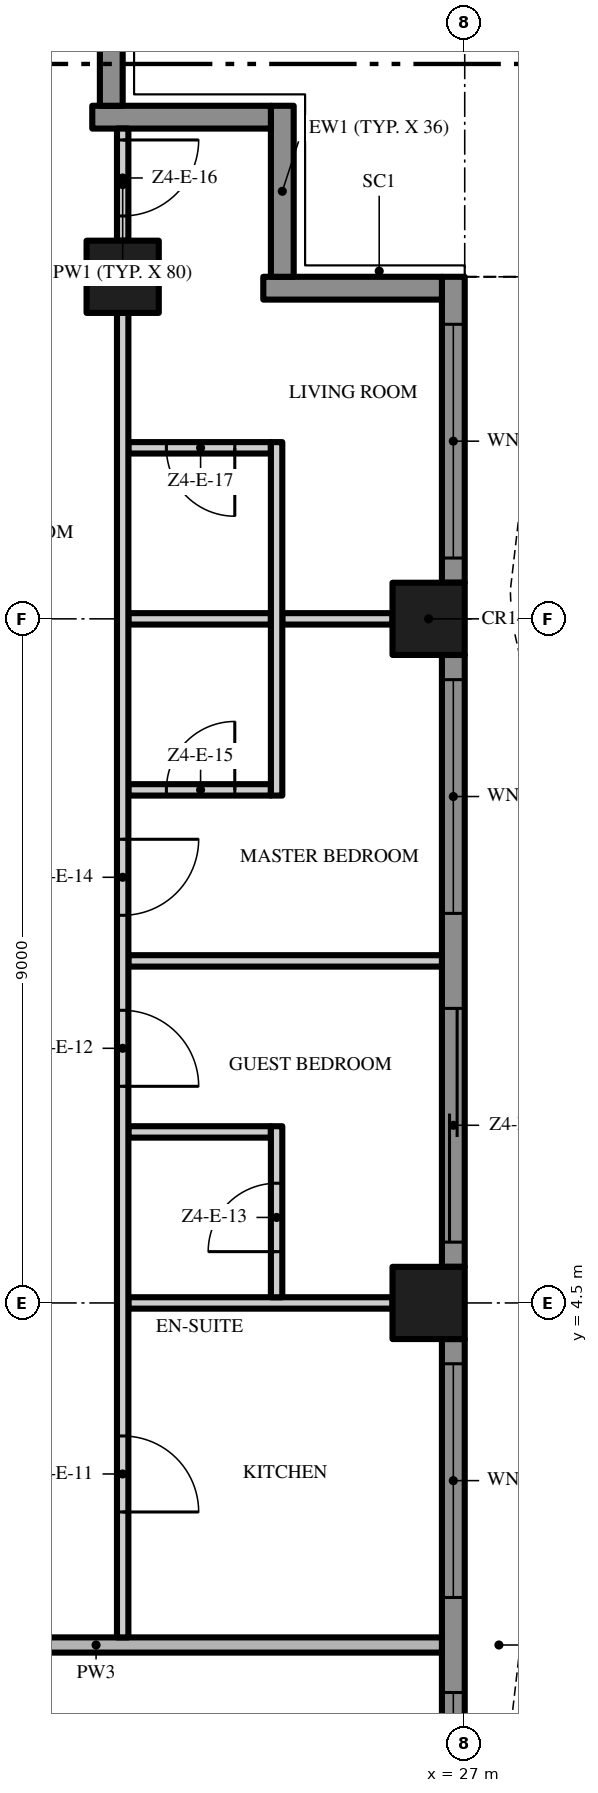
"""IFC4 building model, lengths in metres.
Left out: names, types, materials, properties, quantities, classifications, styles, units other than length and angle.
Written with IfcOpenShell. Run it as: python <this file> out.ifc"""

import sys

from ifc_helpers import new_model, si_unit, direction, frame, frame_2d, origin, origin_2d, place, context, subcontext, project, spatial, polyline, rectangle, outline, extrude, element, fill, save


model = new_model("IFC4")
c1 = context("Model", 3, precision=1e-05, world=origin(), true_north=direction((0.0, 1.0)))
c2 = subcontext(c1, "Body", "Model", "MODEL_VIEW")
j1 = project(units=[si_unit("LENGTHUNIT", "METRE"), si_unit("PLANEANGLEUNIT", "RADIAN")], contexts=[c1])
p1 = place(None, origin())
s1 = spatial("IfcSite", under=j1, at=p1, CompositionType="ELEMENT")
p2 = place(p1, origin())
s2 = spatial("IfcBuilding", under=s1, at=p2, CompositionType="ELEMENT")
p3 = place(p2, frame((0.0, 0.0, 230.0)))
s3 = spatial("IfcBuildingStorey", under=s2, at=p3, CompositionType="ELEMENT", Elevation=230.0)
for number, where, z_axis, x_axis in (
    (1, (26.525, 13.5, 0.0), (0.0, 0.0, 1.0), (1.0, 0.0, 0.0)),
    (2, (22.5, 18.0, 0.0), (0.0, 0.0, 1.0), (1.0, 0.0, 0.0)),
    (3, (26.525, 4.5, 0.0), (0.0, 0.0, 1.0), (1.0, 0.0, 0.0)),
):
    element("IfcColumn", number, at=place(p3, frame(where, z_axis=z_axis, x_axis=x_axis)), inside=s3, PredefinedType="COLUMN", context=c2, shape_type="SweptSolid", body=[
        extrude(rectangle(XDim=0.95, YDim=0.95, at=origin_2d()), origin(), (0.0, 0.0, 1.0), 3.5),
    ])
p4 = place(p3, frame((26.85, 4.025, 0.0), z_axis=(0.0, 0.0, 1.0), x_axis=(0.0, -1.0, 0.0)))
e4 = element("IfcWall", 4, at=p4, inside=s3, PredefinedType="SOLIDWALL", context=c2, shape_type="SweptSolid", body=[
    extrude(rectangle(XDim=8.05, YDim=0.3, at=frame_2d((4.025, 0.0))), origin(), (0.0, 0.0, 1.0), 3.5),
])
p5 = place(p4, frame((4.65, 0.0, 0.45)))
e5 = element("IfcOpeningElement", 5, at=p5, cuts=e4, PredefinedType="OPENING", context=c2, shape_type="SweptSolid", body=[
    extrude(rectangle(XDim=3.075, YDim=2.65, at=frame_2d((1.538, 1.325))), frame((0.0, 0.16, 0.0), z_axis=(0.0, -1.0, 0.0), x_axis=(1.0, 0.0, 0.0)), (0.0, 0.0, 1.0), 0.32),
])
p6 = place(p4, frame((0.325, 0.0, 0.45)))
e6 = element("IfcOpeningElement", 6, at=p6, cuts=e4, PredefinedType="OPENING", context=c2, shape_type="SweptSolid", body=[
    extrude(rectangle(XDim=3.075, YDim=2.65, at=frame_2d((1.538, 1.325))), frame((0.0, 0.16, 0.0), z_axis=(0.0, -1.0, 0.0), x_axis=(1.0, 0.0, 0.0)), (0.0, 0.0, 1.0), 0.32),
])
p7 = place(p3, frame((26.85, 13.025, 0.0), z_axis=(0.0, 0.0, 1.0), x_axis=(0.0, -1.0, 0.0)))
e7 = element("IfcWall", 7, at=p7, inside=s3, PredefinedType="SOLIDWALL", context=c2, shape_type="SweptSolid", body=[
    extrude(rectangle(XDim=8.05, YDim=0.3, at=frame_2d((4.025, 0.0))), origin(), (0.0, 0.0, 1.0), 3.5),
])
p8 = place(p7, frame((4.65, 0.0, 0.0)))
e8 = element("IfcOpeningElement", 8, at=p8, cuts=e7, PredefinedType="OPENING", context=c2, shape_type="SweptSolid", body=[
    extrude(rectangle(XDim=3.075, YDim=2.4, at=frame_2d((1.538, 1.2))), frame((0.0, 0.16, 0.0), z_axis=(0.0, -1.0, 0.0), x_axis=(1.0, 0.0, 0.0)), (0.0, 0.0, 1.0), 0.32),
])
p9 = place(p7, frame((0.325, 0.0, 0.45)))
e9 = element("IfcOpeningElement", 9, at=p9, cuts=e7, PredefinedType="OPENING", context=c2, shape_type="SweptSolid", body=[
    extrude(rectangle(XDim=3.075, YDim=2.65, at=frame_2d((1.538, 1.325))), frame((0.0, 0.16, 0.0), z_axis=(0.0, -1.0, 0.0), x_axis=(1.0, 0.0, 0.0)), (0.0, 0.0, 1.0), 0.32),
])
p10 = place(p3, frame((26.85, 18.0, 0.0), z_axis=(0.0, 0.0, 1.0), x_axis=(0.0, -1.0, 0.0)))
e10 = element("IfcWall", 10, at=p10, inside=s3, PredefinedType="SOLIDWALL", context=c2, shape_type="SweptSolid", body=[
    extrude(rectangle(XDim=4.025, YDim=0.3, at=frame_2d((2.013, 0.0))), origin(), (0.0, 0.0, 1.0), 3.5),
])
p11 = place(p10, frame((0.625, 0.0, 0.45)))
e11 = element("IfcOpeningElement", 11, at=p11, cuts=e10, PredefinedType="OPENING", context=c2, shape_type="SweptSolid", body=[
    extrude(rectangle(XDim=3.075, YDim=2.65, at=frame_2d((1.538, 1.325))), frame((0.0, 0.16, 0.0), z_axis=(0.0, -1.0, 0.0), x_axis=(1.0, 0.0, 0.0)), (0.0, 0.0, 1.0), 0.32),
])
p12 = place(p3, frame((24.35, 17.85, 0.0), z_axis=(0.0, 0.0, 1.0), x_axis=(1.0, 0.0, 0.0)))
e12 = element("IfcWall", 12, at=p12, inside=s3, PredefinedType="SOLIDWALL", context=c2, shape_type="SweptSolid", body=[
    extrude(rectangle(XDim=2.35, YDim=0.3, at=frame_2d((1.175, 0.0))), origin(), (0.0, 0.0, 1.0), 3.5),
])
p13 = place(p3, frame((24.6, 20.25, 0.0), z_axis=(0.0, 0.0, 1.0), x_axis=(0.0, -1.0, 0.0)))
e13 = element("IfcWall", 13, at=p13, inside=s3, PredefinedType="SOLIDWALL", context=c2, shape_type="SweptSolid", body=[
    extrude(rectangle(XDim=2.25, YDim=0.3, at=frame_2d((1.125, 0.0))), origin(), (0.0, 0.0, 1.0), 3.5),
])
p14 = place(p3, frame((22.1, 20.1, 0.0), z_axis=(0.0, 0.0, 1.0), x_axis=(1.0, 0.0, 0.0)))
e14 = element("IfcWall", 14, at=p14, inside=s3, PredefinedType="SOLIDWALL", context=c2, shape_type="SweptSolid", body=[
    extrude(rectangle(XDim=2.35, YDim=0.3, at=frame_2d((1.175, 0.0))), origin(), (0.0, 0.0, 1.0), 3.5),
])
p15 = place(p3, frame((22.35, 22.5, 0.0), z_axis=(0.0, 0.0, 1.0), x_axis=(0.0, -1.0, 0.0)))
e15 = element("IfcWall", 15, at=p15, inside=s3, PredefinedType="SOLIDWALL", context=c2, shape_type="SweptSolid", body=[
    extrude(rectangle(XDim=2.25, YDim=0.3, at=frame_2d((1.125, 0.0))), origin(), (0.0, 0.0, 1.0), 3.5),
])
p16 = place(p3, origin())
e16 = element("IfcWall", 16, at=p16, inside=s3, PredefinedType="USERDEFINED", context=c2, shape_type="SweptSolid", body=[
    extrude(outline(polyline([(27.951, -18.0), (27.615, -16.5), (27.6, -16.125), (27.731, -15.0), (28.255, -13.5), (28.988, -12.0), (29.649, -10.5), (29.985, -9.0), (30.0, -8.625), (29.869, -7.5), (29.345, -6.0), (28.612, -4.5), (27.951, -3.0), (27.615, -1.5), (27.6, -1.125), (27.731, 0.0), (28.255, 1.5), (28.988, 3.0), (29.649, 4.5), (29.985, 6.0), (30.0, 6.375), (29.869, 7.5), (29.345, 9.0), (28.612, 10.5), (27.951, 12.0), (27.615, 13.5), (27.6, 13.875), (27.731, 15.0), (28.255, 16.5), (28.988, 18.0), (28.763, 18.11), (28.024, 16.596), (27.486, 15.056), (27.349, 13.885), (27.366, 13.467), (27.713, 11.921), (28.385, 10.395), (29.114, 8.904), (29.624, 7.444), (29.749, 6.365), (29.736, 6.033), (29.41, 4.579), (28.761, 3.105), (28.024, 1.596), (27.486, 0.056), (27.349, -1.115), (27.366, -1.533), (27.713, -3.079), (28.385, -4.605), (29.114, -6.096), (29.624, -7.556), (29.749, -8.635), (29.736, -8.967), (29.41, -10.421), (28.761, -11.895), (28.024, -13.404), (27.486, -14.944), (27.349, -16.115), (27.366, -16.533), (27.708, -18.055), (27.951, -18.0)])), origin(), (0.0, 0.0, 1.0), 0.9),
])
p17 = place(p3, frame((17.6, 0.0, 0.0), z_axis=(0.0, 0.0, 1.0), x_axis=(1.0, 0.0, 0.0)))
e17 = element("IfcWall", 17, at=p17, inside=s3, PredefinedType="PARTITIONING", context=c2, shape_type="SweptSolid", body=[
    extrude(rectangle(XDim=9.1, YDim=0.2, at=frame_2d((4.55, 0.0))), origin(), (0.0, 0.0, 1.0), 3.5),
])
p18 = place(p3, frame((22.575, 4.5, 0.0), z_axis=(0.0, 0.0, 1.0), x_axis=(1.0, 0.0, 0.0)))
e18 = element("IfcWall", 18, at=p18, inside=s3, PredefinedType="PARTITIONING", context=c2, shape_type="SweptSolid", body=[
    extrude(rectangle(XDim=3.475, YDim=0.15, at=frame_2d((1.738, 0.0))), origin(), (0.0, 0.0, 1.0), 3.5),
])
p19 = place(p3, frame((22.575, 6.75, 0.0), z_axis=(0.0, 0.0, 1.0), x_axis=(1.0, 0.0, 0.0)))
e19 = element("IfcWall", 19, at=p19, inside=s3, PredefinedType="PARTITIONING", context=c2, shape_type="SweptSolid", body=[
    extrude(rectangle(XDim=1.875, YDim=0.15, at=frame_2d((0.938, 0.0))), origin(), (0.0, 0.0, 1.0), 3.5),
])
p20 = place(p3, frame((22.575, 9.0, 0.0), z_axis=(0.0, 0.0, 1.0), x_axis=(1.0, 0.0, 0.0)))
e20 = element("IfcWall", 20, at=p20, inside=s3, PredefinedType="PARTITIONING", context=c2, shape_type="SweptSolid", body=[
    extrude(rectangle(XDim=4.125, YDim=0.15, at=frame_2d((2.062, 0.0))), origin(), (0.0, 0.0, 1.0), 3.5),
])
p21 = place(p3, frame((22.575, 11.25, 0.0), z_axis=(0.0, 0.0, 1.0), x_axis=(1.0, 0.0, 0.0)))
e21 = element("IfcWall", 21, at=p21, inside=s3, PredefinedType="PARTITIONING", context=c2, shape_type="SweptSolid", body=[
    extrude(rectangle(XDim=1.875, YDim=0.15, at=frame_2d((0.938, 0.0))), origin(), (0.0, 0.0, 1.0), 3.5),
])
p22 = place(p21, frame((0.5, 0.0, 0.0)))
e22 = element("IfcOpeningElement", 22, at=p22, cuts=e21, PredefinedType="OPENING", context=c2, shape_type="SweptSolid", body=[
    extrude(rectangle(XDim=0.9, YDim=2.1, at=frame_2d((0.45, 1.05))), frame((0.0, 0.085, 0.0), z_axis=(0.0, -1.0, 0.0), x_axis=(1.0, 0.0, 0.0)), (0.0, 0.0, 1.0), 0.17),
])
p23 = place(p3, frame((22.575, 13.5, 0.0), z_axis=(0.0, 0.0, 1.0), x_axis=(1.0, 0.0, 0.0)))
e23 = element("IfcWall", 23, at=p23, inside=s3, PredefinedType="PARTITIONING", context=c2, shape_type="SweptSolid", body=[
    extrude(rectangle(XDim=1.875, YDim=0.15, at=frame_2d((0.938, 0.0))), origin(), (0.0, 0.0, 1.0), 3.5),
])
p24 = place(p3, frame((24.6, 13.5, 0.0), z_axis=(0.0, 0.0, 1.0), x_axis=(1.0, 0.0, 0.0)))
e24 = element("IfcWall", 24, at=p24, inside=s3, PredefinedType="PARTITIONING", context=c2, shape_type="SweptSolid", body=[
    extrude(rectangle(XDim=1.45, YDim=0.15, at=frame_2d((0.725, 0.0))), origin(), (0.0, 0.0, 1.0), 3.5),
])
p25 = place(p3, frame((24.45, 15.75, 0.0), z_axis=(0.0, 0.0, 1.0), x_axis=(-1.0, 0.0, 0.0)))
e25 = element("IfcWall", 25, at=p25, inside=s3, PredefinedType="PARTITIONING", context=c2, shape_type="SweptSolid", body=[
    extrude(rectangle(XDim=1.875, YDim=0.15, at=frame_2d((0.938, 0.0))), origin(), (0.0, 0.0, 1.0), 3.5),
])
p26 = place(p25, frame((0.475, 0.0, 0.0)))
e26 = element("IfcOpeningElement", 26, at=p26, cuts=e25, PredefinedType="OPENING", context=c2, shape_type="SweptSolid", body=[
    extrude(rectangle(XDim=0.9, YDim=2.1, at=frame_2d((0.45, 1.05))), frame((0.0, 0.085, 0.0), z_axis=(0.0, -1.0, 0.0), x_axis=(1.0, 0.0, 0.0)), (0.0, 0.0, 1.0), 0.17),
])
p27 = place(p3, frame((22.5, 17.525, 0.0), z_axis=(0.0, 0.0, 1.0), x_axis=(0.0, -1.0, 0.0)))
e27 = element("IfcWall", 27, at=p27, inside=s3, PredefinedType="PARTITIONING", context=c2, shape_type="SweptSolid", body=[
    extrude(rectangle(XDim=17.425, YDim=0.15, at=frame_2d((8.713, 0.0))), origin(), (0.0, 0.0, 1.0), 3.5),
])
p28 = place(p27, frame((14.775, 0.0, 0.0)))
e28 = element("IfcOpeningElement", 28, at=p28, cuts=e27, PredefinedType="OPENING", context=c2, shape_type="SweptSolid", body=[
    extrude(rectangle(XDim=1.0, YDim=2.4, at=frame_2d((0.5, 1.2))), frame((0.0, 0.085, 0.0), z_axis=(0.0, -1.0, 0.0), x_axis=(1.0, 0.0, 0.0)), (0.0, 0.0, 1.0), 0.17),
])
p29 = place(p27, frame((9.175, 0.0, 0.0)))
e29 = element("IfcOpeningElement", 29, at=p29, cuts=e27, PredefinedType="OPENING", context=c2, shape_type="SweptSolid", body=[
    extrude(rectangle(XDim=1.0, YDim=2.4, at=frame_2d((0.5, 1.2))), frame((0.0, 0.085, 0.0), z_axis=(0.0, -1.0, 0.0), x_axis=(1.0, 0.0, 0.0)), (0.0, 0.0, 1.0), 0.17),
])
p30 = place(p27, frame((6.925, 0.0, 0.0)))
e30 = element("IfcOpeningElement", 30, at=p30, cuts=e27, PredefinedType="OPENING", context=c2, shape_type="SweptSolid", body=[
    extrude(rectangle(XDim=1.0, YDim=2.4, at=frame_2d((0.5, 1.2))), frame((0.0, 0.085, 0.0), z_axis=(0.0, -1.0, 0.0), x_axis=(1.0, 0.0, 0.0)), (0.0, 0.0, 1.0), 0.17),
])
p31 = place(p3, frame((22.5, 19.95, 0.0), z_axis=(0.0, 0.0, 1.0), x_axis=(0.0, -1.0, 0.0)))
e31 = element("IfcWall", 31, at=p31, inside=s3, PredefinedType="PARTITIONING", context=c2, shape_type="SweptSolid", body=[
    extrude(rectangle(XDim=1.475, YDim=0.15, at=frame_2d((0.738, 0.0))), origin(), (0.0, 0.0, 1.0), 3.5),
])
p32 = place(p31, frame((0.15, 0.0, 0.0)))
e32 = element("IfcOpeningElement", 32, at=p32, cuts=e31, PredefinedType="OPENING", context=c2, shape_type="SweptSolid", body=[
    extrude(rectangle(XDim=1.0, YDim=2.4, at=frame_2d((0.5, 1.2))), frame((0.0, 0.085, 0.0), z_axis=(0.0, -1.0, 0.0), x_axis=(1.0, 0.0, 0.0)), (0.0, 0.0, 1.0), 0.17),
])
p33 = place(p3, frame((24.525, 4.575, 0.0), z_axis=(0.0, 0.0, 1.0), x_axis=(0.0, 1.0, 0.0)))
e33 = element("IfcWall", 33, at=p33, inside=s3, PredefinedType="PARTITIONING", context=c2, shape_type="SweptSolid", body=[
    extrude(rectangle(XDim=2.25, YDim=0.15, at=frame_2d((1.125, 0.0))), origin(), (0.0, 0.0, 1.0), 3.5),
])
p34 = place(p33, frame((0.6, 0.0, 0.0)))
e34 = element("IfcOpeningElement", 34, at=p34, cuts=e33, PredefinedType="OPENING", context=c2, shape_type="SweptSolid", body=[
    extrude(rectangle(XDim=0.9, YDim=2.1, at=frame_2d((0.45, 1.05))), frame((0.0, 0.085, 0.0), z_axis=(0.0, -1.0, 0.0), x_axis=(1.0, 0.0, 0.0)), (0.0, 0.0, 1.0), 0.17),
])
p35 = place(p3, frame((24.525, 11.175, 0.0), z_axis=(0.0, 0.0, 1.0), x_axis=(0.0, 1.0, 0.0)))
e35 = element("IfcWall", 35, at=p35, inside=s3, PredefinedType="PARTITIONING", context=c2, shape_type="SweptSolid", body=[
    extrude(rectangle(XDim=4.65, YDim=0.15, at=frame_2d((2.325, 0.0))), origin(), (0.0, 0.0, 1.0), 3.5),
])
p36 = place(p5, origin())
e36 = element("IfcWindow", 36, at=p36, inside=s3, PartitioningType="SINGLE_PANEL", PredefinedType="WINDOW", context=c2, shape_type="SweptSolid", body=[
    extrude(rectangle(XDim=3.075, YDim=2.65, at=frame_2d((1.538, 1.325))), frame((0.0, 0.03, 0.0), z_axis=(0.0, -1.0, 0.0), x_axis=(1.0, 0.0, 0.0)), (0.0, 0.0, 1.0), 0.06),
])
fill(e5, e36)
p37 = place(p6, origin())
e37 = element("IfcWindow", 37, at=p37, inside=s3, PartitioningType="SINGLE_PANEL", PredefinedType="WINDOW", context=c2, shape_type="SweptSolid", body=[
    extrude(rectangle(XDim=3.075, YDim=2.65, at=frame_2d((1.538, 1.325))), frame((0.0, 0.03, 0.0), z_axis=(0.0, -1.0, 0.0), x_axis=(1.0, 0.0, 0.0)), (0.0, 0.0, 1.0), 0.06),
])
fill(e6, e37)
p38 = place(p8, origin())
e38 = element("IfcDoor", 38, at=p38, inside=s3, OperationType="SINGLE_SWING_LEFT", PredefinedType="DOOR", context=c2, shape_type="SweptSolid", body=[
    extrude(rectangle(XDim=3.075, YDim=2.4, at=frame_2d((1.538, 1.2))), frame((0.0, 0.025, 0.0), z_axis=(0.0, -1.0, 0.0), x_axis=(1.0, 0.0, 0.0)), (0.0, 0.0, 1.0), 0.05),
])
fill(e8, e38)
p39 = place(p9, origin())
e39 = element("IfcWindow", 39, at=p39, inside=s3, PartitioningType="SINGLE_PANEL", PredefinedType="WINDOW", context=c2, shape_type="SweptSolid", body=[
    extrude(rectangle(XDim=3.075, YDim=2.65, at=frame_2d((1.538, 1.325))), frame((0.0, 0.03, 0.0), z_axis=(0.0, -1.0, 0.0), x_axis=(1.0, 0.0, 0.0)), (0.0, 0.0, 1.0), 0.06),
])
fill(e9, e39)
p40 = place(p11, origin())
e40 = element("IfcWindow", 40, at=p40, inside=s3, PartitioningType="SINGLE_PANEL", PredefinedType="WINDOW", context=c2, shape_type="SweptSolid", body=[
    extrude(rectangle(XDim=3.075, YDim=2.65, at=frame_2d((1.538, 1.325))), frame((0.0, 0.03, 0.0), z_axis=(0.0, -1.0, 0.0), x_axis=(1.0, 0.0, 0.0)), (0.0, 0.0, 1.0), 0.06),
])
fill(e11, e40)
p41 = place(p28, origin())
e41 = element("IfcDoor", 41, at=p41, inside=s3, OperationType="SINGLE_SWING_RIGHT", PredefinedType="DOOR", context=c2, shape_type="SweptSolid", body=[
    extrude(rectangle(XDim=1.0, YDim=2.4, at=frame_2d((0.5, 1.2))), frame((0.0, 0.025, 0.0), z_axis=(0.0, -1.0, 0.0), x_axis=(1.0, 0.0, 0.0)), (0.0, 0.0, 1.0), 0.05),
])
fill(e28, e41)
p42 = place(p29, origin())
e42 = element("IfcDoor", 42, at=p42, inside=s3, OperationType="SINGLE_SWING_RIGHT", PredefinedType="DOOR", context=c2, shape_type="SweptSolid", body=[
    extrude(rectangle(XDim=1.0, YDim=2.4, at=frame_2d((0.5, 1.2))), frame((0.0, 0.025, 0.0), z_axis=(0.0, -1.0, 0.0), x_axis=(1.0, 0.0, 0.0)), (0.0, 0.0, 1.0), 0.05),
])
fill(e29, e42)
p43 = place(p34, origin())
e43 = element("IfcDoor", 43, at=p43, inside=s3, OperationType="SINGLE_SWING_LEFT", PredefinedType="DOOR", context=c2, shape_type="SweptSolid", body=[
    extrude(rectangle(XDim=0.9, YDim=2.1, at=frame_2d((0.45, 1.05))), frame((0.0, 0.025, 0.0), z_axis=(0.0, -1.0, 0.0), x_axis=(1.0, 0.0, 0.0)), (0.0, 0.0, 1.0), 0.05),
])
fill(e34, e43)
p44 = place(p30, origin())
e44 = element("IfcDoor", 44, at=p44, inside=s3, OperationType="SINGLE_SWING_LEFT", PredefinedType="DOOR", context=c2, shape_type="SweptSolid", body=[
    extrude(rectangle(XDim=1.0, YDim=2.4, at=frame_2d((0.5, 1.2))), frame((0.0, 0.025, 0.0), z_axis=(0.0, -1.0, 0.0), x_axis=(1.0, 0.0, 0.0)), (0.0, 0.0, 1.0), 0.05),
])
fill(e30, e44)
p45 = place(p22, origin())
e45 = element("IfcDoor", 45, at=p45, inside=s3, OperationType="SINGLE_SWING_RIGHT", PredefinedType="DOOR", context=c2, shape_type="SweptSolid", body=[
    extrude(rectangle(XDim=0.9, YDim=2.1, at=frame_2d((0.45, 1.05))), frame((0.0, 0.025, 0.0), z_axis=(0.0, -1.0, 0.0), x_axis=(1.0, 0.0, 0.0)), (0.0, 0.0, 1.0), 0.05),
])
fill(e22, e45)
p46 = place(p32, origin())
e46 = element("IfcDoor", 46, at=p46, inside=s3, OperationType="SINGLE_SWING_LEFT", PredefinedType="DOOR", context=c2, shape_type="SweptSolid", body=[
    extrude(rectangle(XDim=1.0, YDim=2.4, at=frame_2d((0.5, 1.2))), frame((0.0, 0.025, 0.0), z_axis=(0.0, -1.0, 0.0), x_axis=(1.0, 0.0, 0.0)), (0.0, 0.0, 1.0), 0.05),
])
fill(e32, e46)
p47 = place(p26, origin())
e47 = element("IfcDoor", 47, at=p47, inside=s3, OperationType="SINGLE_SWING_LEFT", PredefinedType="DOOR", context=c2, shape_type="SweptSolid", body=[
    extrude(rectangle(XDim=0.9, YDim=2.1, at=frame_2d((0.45, 1.05))), frame((0.0, 0.025, 0.0), z_axis=(0.0, -1.0, 0.0), x_axis=(1.0, 0.0, 0.0)), (0.0, 0.0, 1.0), 0.05),
])
fill(e26, e47)
save(model, sys.argv[1])
